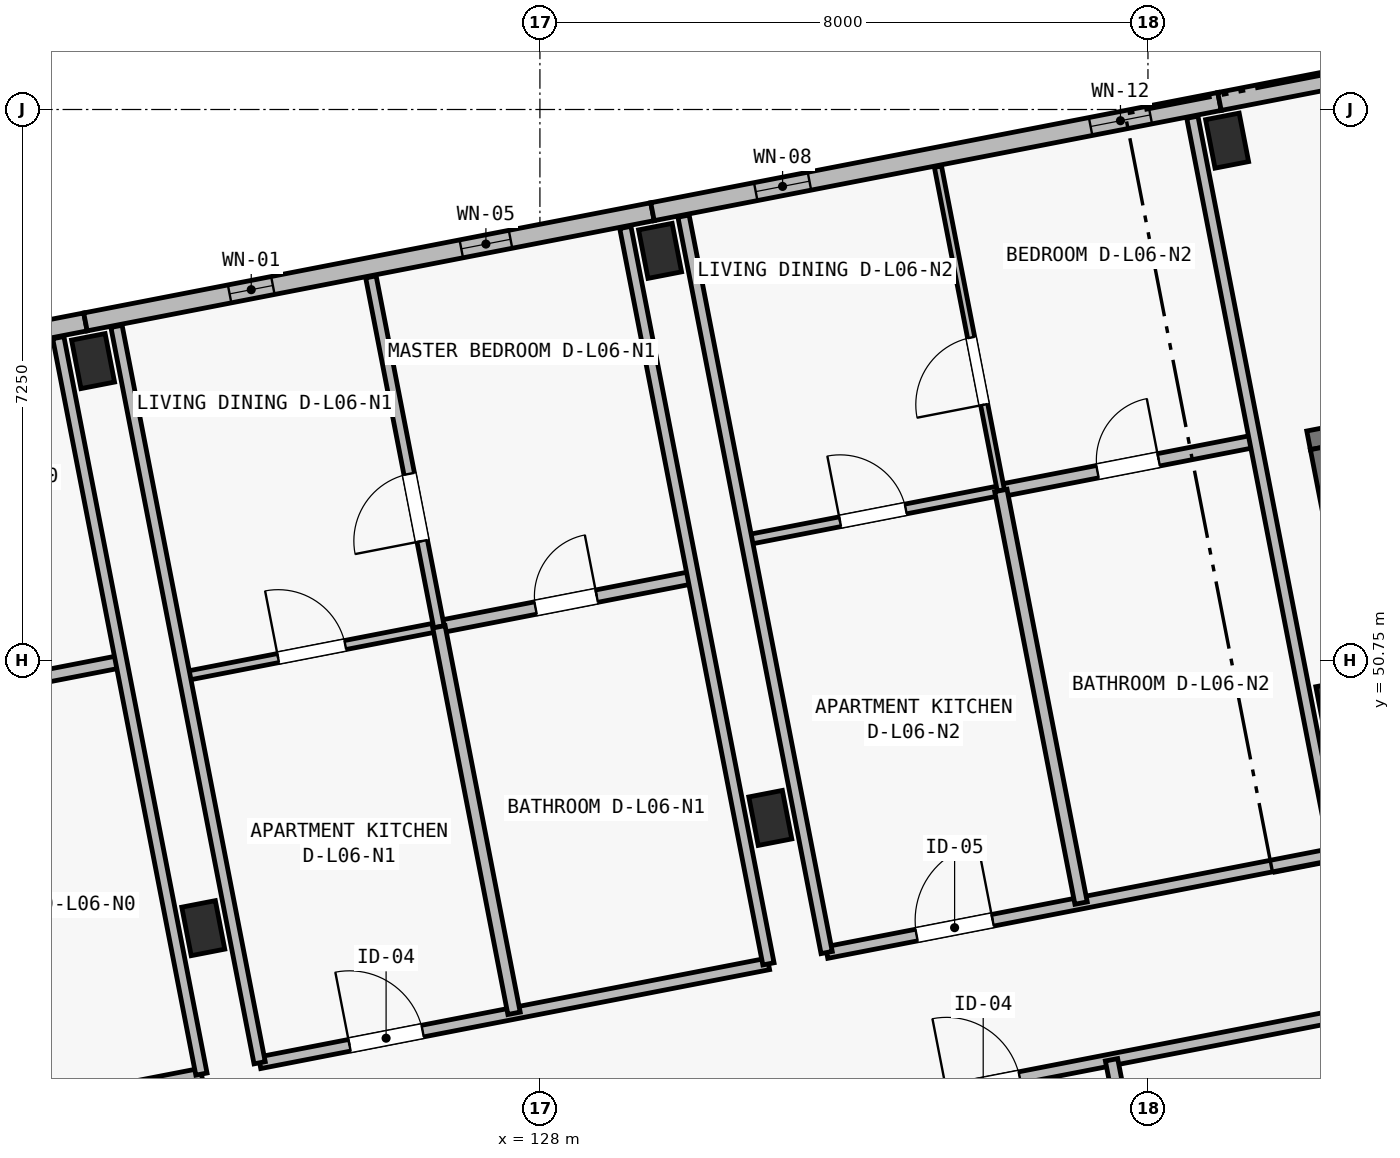
"""IFC4 building model, lengths in metres.
Left out: names, types, materials, properties, quantities, classifications, styles, units other than length and angle.
Written with IfcOpenShell. Run it as: python <this file> out.ifc"""

import sys

from ifc_helpers import new_model, si_unit, direction, frame, frame_2d, origin, origin_2d, place, context, subcontext, project, spatial, rectangle, extrude, element, fill, save


model = new_model("IFC4")
c1 = context("Model", 3, precision=1e-05, world=origin(), true_north=direction((0.0, 1.0)))
c2 = subcontext(c1, "Body", "Model", "MODEL_VIEW")
j1 = project(units=[si_unit("LENGTHUNIT", "METRE"), si_unit("PLANEANGLEUNIT", "RADIAN")], contexts=[c1])
p1 = place(None, origin())
s1 = spatial("IfcSite", under=j1, at=p1, CompositionType="ELEMENT")
p2 = place(p1, origin())
s2 = spatial("IfcBuilding", under=s1, at=p2, CompositionType="ELEMENT")
p3 = place(p2, frame((0.0, 0.0, 21.4)))
s3 = spatial("IfcBuildingStorey", under=s2, at=p3, CompositionType="ELEMENT", Elevation=21.4)
for number, where, z_axis, x_axis in (
    (1, (123.571, 47.23, 0.0), (0.0, 0.0, 1.0), (0.982, 0.191, 0.0)),
    (2, (122.121, 54.69, 0.0), (0.0, 0.0, 1.0), (0.982, 0.191, 0.0)),
    (3, (131.031, 48.68, 0.0), (0.0, 0.0, 1.0), (0.982, 0.191, 0.0)),
    (4, (129.581, 56.14, 0.0), (0.0, 0.0, 1.0), (0.982, 0.191, 0.0)),
    (5, (138.491, 50.13, 0.0), (0.0, 0.0, 1.0), (0.982, 0.191, 0.0)),
    (6, (137.041, 57.59, 0.0), (0.0, 0.0, 1.0), (0.982, 0.191, 0.0)),
):
    element("IfcColumn", number, at=place(p3, frame(where, z_axis=z_axis, x_axis=x_axis)), inside=s3, PredefinedType="COLUMN", context=c2, shape_type="SweptSolid", body=[
        extrude(rectangle(XDim=0.45, YDim=0.65, at=origin_2d()), origin(), (0.0, 0.0, 1.0), 3.25),
    ])
p4 = place(p3, frame((138.113, 53.647, 0.0), z_axis=(0.0, 0.0, 1.0), x_axis=(0.981626097708, 0.19081458094, 0.0)))
e7 = element("IfcWall", 7, at=p4, inside=s3, PredefinedType="SHEAR", context=c2, shape_type="SweptSolid", body=[
    extrude(rectangle(XDim=7.0, YDim=0.25, at=frame_2d((3.5, 0.0))), origin(), (0.0, 0.0, 1.0), 3.25),
])
p5 = place(p4, frame((0.45, 0.0, 0.0)))
e8 = element("IfcOpeningElement", 8, at=p5, cuts=e7, PredefinedType="OPENING", context=c2, shape_type="SweptSolid", body=[
    extrude(rectangle(XDim=0.9, YDim=2.1, at=frame_2d((0.45, 1.05))), frame((0.0, 0.14, 0.0), z_axis=(0.0, -1.0, 0.0), x_axis=(1.0, 0.0, 0.0)), (0.0, 0.0, 1.0), 0.28),
])
p6 = place(p3, frame((138.804, 50.751, 0.0), z_axis=(0.0, 0.0, 1.0), x_axis=(-0.190858194834, 0.981617618762, 0.0)))
e9 = element("IfcWall", 9, at=p6, inside=s3, PredefinedType="SHEAR", context=c2, shape_type="SweptSolid", body=[
    extrude(rectangle(XDim=2.85, YDim=0.25, at=frame_2d((1.425, 0.0))), origin(), (0.0, 0.0, 1.0), 3.25),
])
p7 = place(p3, frame((121.505, 55.105, 0.0), z_axis=(0.0, 0.0, 1.0), x_axis=(0.981656509867, 0.190658062077, 0.0)))
e10 = element("IfcWall", 10, at=p7, inside=s3, PredefinedType="SOLIDWALL", context=c2, shape_type="SweptSolid", body=[
    extrude(rectangle(XDim=0.525, YDim=0.24, at=frame_2d((0.262, 0.0))), origin(), (0.0, 0.0, 1.0), 3.0),
])
p8 = place(p3, frame((122.02, 55.205, 0.0), z_axis=(0.0, 0.0, 1.0), x_axis=(0.981626422232, 0.190812911449, 0.0)))
e11 = element("IfcWall", 11, at=p8, inside=s3, PredefinedType="SOLIDWALL", context=c2, shape_type="SweptSolid", body=[
    extrude(rectangle(XDim=7.6, YDim=0.24, at=frame_2d((3.8, 0.0))), origin(), (0.0, 0.0, 1.0), 3.0),
])
p9 = place(p8, frame((1.932, 0.0, 0.5)))
e12 = element("IfcOpeningElement", 12, at=p9, cuts=e11, PredefinedType="OPENING", context=c2, shape_type="SweptSolid", body=[
    extrude(rectangle(XDim=0.58, YDim=2.16, at=frame_2d((0.29, 1.08))), frame((0.0, 0.135, 0.0), z_axis=(0.0, -1.0, 0.0), x_axis=(1.0, 0.0, 0.0)), (0.0, 0.0, 1.0), 0.27),
])
p10 = place(p8, frame((5.038, 0.0, 0.44)))
e13 = element("IfcOpeningElement", 13, at=p10, cuts=e11, PredefinedType="OPENING", context=c2, shape_type="SweptSolid", body=[
    extrude(rectangle(XDim=0.66, YDim=2.32, at=frame_2d((0.33, 1.16))), frame((0.0, 0.135, 0.0), z_axis=(0.0, -1.0, 0.0), x_axis=(1.0, 0.0, 0.0)), (0.0, 0.0, 1.0), 0.27),
])
p11 = place(p3, frame((129.481, 56.656, 0.0), z_axis=(0.0, 0.0, 1.0), x_axis=(0.981626422232, 0.190812911449, 0.0)))
e14 = element("IfcWall", 14, at=p11, inside=s3, PredefinedType="SOLIDWALL", context=c2, shape_type="SweptSolid", body=[
    extrude(rectangle(XDim=7.6, YDim=0.24, at=frame_2d((3.8, 0.0))), origin(), (0.0, 0.0, 1.0), 3.0),
])
p12 = place(p11, frame((1.384, 0.0, 0.44)))
e15 = element("IfcOpeningElement", 15, at=p12, cuts=e14, PredefinedType="OPENING", context=c2, shape_type="SweptSolid", body=[
    extrude(rectangle(XDim=0.72, YDim=2.16, at=frame_2d((0.36, 1.08))), frame((0.0, 0.135, 0.0), z_axis=(0.0, -1.0, 0.0), x_axis=(1.0, 0.0, 0.0)), (0.0, 0.0, 1.0), 0.27),
])
p13 = place(p11, frame((5.873, 0.0, 0.5)))
e16 = element("IfcOpeningElement", 16, at=p13, cuts=e14, PredefinedType="OPENING", context=c2, shape_type="SweptSolid", body=[
    extrude(rectangle(XDim=0.8, YDim=2.3, at=frame_2d((0.4, 1.15))), frame((0.0, 0.135, 0.0), z_axis=(0.0, -1.0, 0.0), x_axis=(1.0, 0.0, 0.0)), (0.0, 0.0, 1.0), 0.27),
])
p14 = place(p3, frame((136.941, 58.106, 0.0), z_axis=(0.0, 0.0, 1.0), x_axis=(0.981629832251, 0.190795367961, 0.0)))
e17 = element("IfcWall", 17, at=p14, inside=s3, PredefinedType="SOLIDWALL", context=c2, shape_type="SweptSolid", body=[
    extrude(rectangle(XDim=2.375, YDim=0.24, at=frame_2d((1.188, 0.0))), origin(), (0.0, 0.0, 1.0), 3.0),
])
p15 = place(p3, frame((132.021, 44.818, 0.0), z_axis=(0.0, 0.0, 1.0), x_axis=(0.981629109582, 0.190799086008, 0.0)))
e18 = element("IfcWall", 18, at=p15, inside=s3, PredefinedType="PARTITIONING", context=c2, shape_type="SweptSolid", body=[
    extrude(rectangle(XDim=7.13, YDim=0.155, at=frame_2d((3.565, 0.0))), origin(), (0.0, 0.0, 1.0), 2.97),
])
p16 = place(p15, frame((1.355, 0.0, 0.0)))
e19 = element("IfcOpeningElement", 19, at=p16, cuts=e18, PredefinedType="OPENING", context=c2, shape_type="SweptSolid", body=[
    extrude(rectangle(XDim=0.98, YDim=2.15, at=frame_2d((0.49, 1.075))), frame((0.0, 0.093, 0.0), z_axis=(0.0, -1.0, 0.0), x_axis=(1.0, 0.0, 0.0)), (0.0, 0.0, 1.0), 0.185),
])
p17 = place(p3, frame((136.202, 41.994, 0.0), z_axis=(0.0, 0.0, 1.0), x_axis=(-0.190865998276, 0.981616101489, 0.0)))
e20 = element("IfcWall", 20, at=p17, inside=s3, PredefinedType="PLUMBINGWALL", context=c2, shape_type="SweptSolid", body=[
    extrude(rectangle(XDim=3.57, YDim=0.165, at=frame_2d((1.785, 0.0))), origin(), (0.0, 0.0, 1.0), 2.97),
])
p18 = place(p3, frame((116.852, 44.009, 0.0), z_axis=(0.0, 0.0, 1.0), x_axis=(0.981629173664, 0.190798756314, 0.0)))
e21 = element("IfcWall", 21, at=p18, inside=s3, PredefinedType="PARTITIONING", context=c2, shape_type="SweptSolid", body=[
    extrude(rectangle(XDim=6.82, YDim=0.155, at=frame_2d((3.41, 0.0))), origin(), (0.0, 0.0, 1.0), 2.97),
])
p19 = place(p18, frame((1.205, 0.0, 0.0)))
e22 = element("IfcOpeningElement", 22, at=p19, cuts=e21, PredefinedType="OPENING", context=c2, shape_type="SweptSolid", body=[
    extrude(rectangle(XDim=1.02, YDim=2.2, at=frame_2d((0.51, 1.1))), frame((0.0, 0.093, 0.0), z_axis=(0.0, -1.0, 0.0), x_axis=(1.0, 0.0, 0.0)), (0.0, 0.0, 1.0), 0.185),
])
p20 = place(p3, frame((119.144, 50.088, 0.0), z_axis=(0.0, 0.0, 1.0), x_axis=(0.981629173664, 0.190798756314, 0.0)))
e23 = element("IfcWall", 23, at=p20, inside=s3, PredefinedType="PLUMBINGWALL", context=c2, shape_type="SweptSolid", body=[
    extrude(rectangle(XDim=3.41, YDim=0.165, at=frame_2d((1.705, 0.0))), origin(), (0.0, 0.0, 1.0), 2.97),
])
p21 = place(p20, frame((1.295, 0.0, 0.0)))
e24 = element("IfcOpeningElement", 24, at=p21, cuts=e23, PredefinedType="OPENING", context=c2, shape_type="SweptSolid", body=[
    extrude(rectangle(XDim=0.82, YDim=2.08, at=frame_2d((0.41, 1.04))), frame((0.0, 0.097, 0.0), z_axis=(0.0, -1.0, 0.0), x_axis=(1.0, 0.0, 0.0)), (0.0, 0.0, 1.0), 0.195),
])
p22 = place(p3, frame((123.547, 45.31, 0.0), z_axis=(0.0, 0.0, 1.0), x_axis=(-0.190809410863, 0.981627102685, 0.0)))
e25 = element("IfcWall", 25, at=p22, inside=s3, PredefinedType="PARTITIONING", context=c2, shape_type="SweptSolid", body=[
    extrude(rectangle(XDim=9.87, YDim=0.15, at=frame_2d((4.935, 0.0))), origin(), (0.0, 0.0, 1.0), 2.97),
])
p23 = place(p3, frame((124.312, 45.459, 0.0), z_axis=(0.0, 0.0, 1.0), x_axis=(0.981627870431, 0.190805461121, 0.0)))
e26 = element("IfcWall", 26, at=p23, inside=s3, PredefinedType="PARTITIONING", context=c2, shape_type="SweptSolid", body=[
    extrude(rectangle(XDim=6.82, YDim=0.155, at=frame_2d((3.41, 0.0))), origin(), (0.0, 0.0, 1.0), 2.97),
])
p24 = place(p23, frame((1.205, 0.0, 0.0)))
e27 = element("IfcOpeningElement", 27, at=p24, cuts=e26, PredefinedType="OPENING", context=c2, shape_type="SweptSolid", body=[
    extrude(rectangle(XDim=0.98, YDim=2.15, at=frame_2d((0.49, 1.075))), frame((0.0, 0.093, 0.0), z_axis=(0.0, -1.0, 0.0), x_axis=(1.0, 0.0, 0.0)), (0.0, 0.0, 1.0), 0.185),
])
p25 = place(p3, frame((123.324, 50.543, 0.0), z_axis=(0.0, 0.0, 1.0), x_axis=(0.981629173664, 0.190798756314, 0.0)))
e28 = element("IfcWall", 28, at=p25, inside=s3, PredefinedType="PARTITIONING", context=c2, shape_type="SweptSolid", body=[
    extrude(rectangle(XDim=3.41, YDim=0.12, at=frame_2d((1.705, 0.0))), origin(), (0.0, 0.0, 1.0), 2.97),
])
p26 = place(p25, frame((1.255, 0.0, 0.0)))
e29 = element("IfcOpeningElement", 29, at=p26, cuts=e28, PredefinedType="OPENING", context=c2, shape_type="SweptSolid", body=[
    extrude(rectangle(XDim=0.9, YDim=2.1, at=frame_2d((0.45, 1.05))), frame((0.0, 0.075, 0.0), z_axis=(0.0, -1.0, 0.0), x_axis=(1.0, 0.0, 0.0)), (0.0, 0.0, 1.0), 0.15),
])
p27 = place(p3, frame((126.671, 51.194, 0.0), z_axis=(0.0, 0.0, 1.0), x_axis=(0.981629173664, 0.190798756314, 0.0)))
e30 = element("IfcWall", 30, at=p27, inside=s3, PredefinedType="PLUMBINGWALL", context=c2, shape_type="SweptSolid", body=[
    extrude(rectangle(XDim=3.41, YDim=0.165, at=frame_2d((1.705, 0.0))), origin(), (0.0, 0.0, 1.0), 2.97),
])
p28 = place(p27, frame((1.295, 0.0, 0.0)))
e31 = element("IfcOpeningElement", 31, at=p28, cuts=e30, PredefinedType="OPENING", context=c2, shape_type="SweptSolid", body=[
    extrude(rectangle(XDim=0.82, YDim=2.08, at=frame_2d((0.41, 1.04))), frame((0.0, 0.097, 0.0), z_axis=(0.0, -1.0, 0.0), x_axis=(1.0, 0.0, 0.0)), (0.0, 0.0, 1.0), 0.195),
])
p29 = place(p3, frame((126.671, 51.194, 0.0), z_axis=(0.0, 0.0, 1.0), x_axis=(-0.190787451574, 0.981631370893, 0.0)))
e32 = element("IfcWall", 32, at=p29, inside=s3, PredefinedType="PARTITIONING", context=c2, shape_type="SweptSolid", body=[
    extrude(rectangle(XDim=4.69, YDim=0.14, at=frame_2d((2.345, 0.0))), origin(), (0.0, 0.0, 1.0), 2.97),
])
p30 = place(p29, frame((1.15, 0.0, 0.0)))
e33 = element("IfcOpeningElement", 33, at=p30, cuts=e32, PredefinedType="OPENING", context=c2, shape_type="SweptSolid", body=[
    extrude(rectangle(XDim=0.9, YDim=2.1, at=frame_2d((0.45, 1.05))), frame((0.0, 0.085, 0.0), z_axis=(0.0, -1.0, 0.0), x_axis=(1.0, 0.0, 0.0)), (0.0, 0.0, 1.0), 0.17),
])
p31 = place(p3, frame((127.66, 46.109, 0.0), z_axis=(0.0, 0.0, 1.0), x_axis=(-0.190838120755, 0.981621521599, 0.0)))
e34 = element("IfcWall", 34, at=p31, inside=s3, PredefinedType="PLUMBINGWALL", context=c2, shape_type="SweptSolid", body=[
    extrude(rectangle(XDim=5.18, YDim=0.165, at=frame_2d((2.59, 0.0))), origin(), (0.0, 0.0, 1.0), 2.97),
])
p32 = place(p3, frame((124.312, 45.459, 0.0), z_axis=(0.0, 0.0, 1.0), x_axis=(-0.190814044018, 0.981626202078, 0.0)))
e35 = element("IfcWall", 35, at=p32, inside=s3, PredefinedType="PARTITIONING", context=c2, shape_type="SweptSolid", body=[
    extrude(rectangle(XDim=9.87, YDim=0.15, at=frame_2d((4.935, 0.0))), origin(), (0.0, 0.0, 1.0), 2.97),
])
p33 = place(p3, frame((131.007, 46.76, 0.0), z_axis=(0.0, 0.0, 1.0), x_axis=(-0.190809410863, 0.981627102685, 0.0)))
e36 = element("IfcWall", 36, at=p33, inside=s3, PredefinedType="PARTITIONING", context=c2, shape_type="SweptSolid", body=[
    extrude(rectangle(XDim=9.87, YDim=0.15, at=frame_2d((4.935, 0.0))), origin(), (0.0, 0.0, 1.0), 2.97),
])
p34 = place(p3, frame((131.772, 46.909, 0.0), z_axis=(0.0, 0.0, 1.0), x_axis=(0.981622468528, 0.190833249935, 0.0)))
e37 = element("IfcWall", 37, at=p34, inside=s3, PredefinedType="PARTITIONING", context=c2, shape_type="SweptSolid", body=[
    extrude(rectangle(XDim=6.82, YDim=0.155, at=frame_2d((3.41, 0.0))), origin(), (0.0, 0.0, 1.0), 2.97),
])
p35 = place(p34, frame((1.205, 0.0, 0.0)))
e38 = element("IfcOpeningElement", 38, at=p35, cuts=e37, PredefinedType="OPENING", context=c2, shape_type="SweptSolid", body=[
    extrude(rectangle(XDim=1.02, YDim=2.2, at=frame_2d((0.51, 1.1))), frame((0.0, 0.093, 0.0), z_axis=(0.0, -1.0, 0.0), x_axis=(1.0, 0.0, 0.0)), (0.0, 0.0, 1.0), 0.185),
])
p36 = place(p3, frame((130.717, 52.337, 0.0), z_axis=(0.0, 0.0, 1.0), x_axis=(0.981629173664, 0.190798756314, 0.0)))
e39 = element("IfcWall", 39, at=p36, inside=s3, PredefinedType="PARTITIONING", context=c2, shape_type="SweptSolid", body=[
    extrude(rectangle(XDim=3.41, YDim=0.13, at=frame_2d((1.705, 0.0))), origin(), (0.0, 0.0, 1.0), 2.97),
])
p37 = place(p36, frame((1.255, 0.0, 0.0)))
e40 = element("IfcOpeningElement", 40, at=p37, cuts=e39, PredefinedType="OPENING", context=c2, shape_type="SweptSolid", body=[
    extrude(rectangle(XDim=0.88, YDim=2.1, at=frame_2d((0.44, 1.05))), frame((0.0, 0.08, 0.0), z_axis=(0.0, -1.0, 0.0), x_axis=(1.0, 0.0, 0.0)), (0.0, 0.0, 1.0), 0.16),
])
p38 = place(p3, frame((134.065, 52.988, 0.0), z_axis=(0.0, 0.0, 1.0), x_axis=(0.981629173664, 0.190798756314, 0.0)))
e41 = element("IfcWall", 41, at=p38, inside=s3, PredefinedType="PLUMBINGWALL", context=c2, shape_type="SweptSolid", body=[
    extrude(rectangle(XDim=3.41, YDim=0.165, at=frame_2d((1.705, 0.0))), origin(), (0.0, 0.0, 1.0), 2.97),
])
p39 = place(p38, frame((1.295, 0.0, 0.0)))
e42 = element("IfcOpeningElement", 42, at=p39, cuts=e41, PredefinedType="OPENING", context=c2, shape_type="SweptSolid", body=[
    extrude(rectangle(XDim=0.82, YDim=2.08, at=frame_2d((0.41, 1.04))), frame((0.0, 0.097, 0.0), z_axis=(0.0, -1.0, 0.0), x_axis=(1.0, 0.0, 0.0)), (0.0, 0.0, 1.0), 0.195),
])
p40 = place(p3, frame((134.065, 52.988, 0.0), z_axis=(0.0, 0.0, 1.0), x_axis=(-0.190812443151, 0.981626513262, 0.0)))
e43 = element("IfcWall", 43, at=p40, inside=s3, PredefinedType="PARTITIONING", context=c2, shape_type="SweptSolid", body=[
    extrude(rectangle(XDim=4.34, YDim=0.095, at=frame_2d((2.17, 0.0))), origin(), (0.0, 0.0, 1.0), 2.97),
])
p41 = place(p40, frame((1.15, 0.0, 0.0)))
e44 = element("IfcOpeningElement", 44, at=p41, cuts=e43, PredefinedType="OPENING", context=c2, shape_type="SweptSolid", body=[
    extrude(rectangle(XDim=0.9, YDim=2.1, at=frame_2d((0.45, 1.05))), frame((0.0, 0.062, 0.0), z_axis=(0.0, -1.0, 0.0), x_axis=(1.0, 0.0, 0.0)), (0.0, 0.0, 1.0), 0.125),
])
p42 = place(p3, frame((135.12, 47.559, 0.0), z_axis=(0.0, 0.0, 1.0), x_axis=(-0.190807031124, 0.981627565258, 0.0)))
e45 = element("IfcWall", 45, at=p42, inside=s3, PredefinedType="PLUMBINGWALL", context=c2, shape_type="SweptSolid", body=[
    extrude(rectangle(XDim=5.53, YDim=0.165, at=frame_2d((2.765, 0.0))), origin(), (0.0, 0.0, 1.0), 2.97),
])
p43 = place(p3, frame((131.772, 46.909, 0.0), z_axis=(0.0, 0.0, 1.0), x_axis=(-0.1907855758, 0.981631735462, 0.0)))
e46 = element("IfcWall", 46, at=p43, inside=s3, PredefinedType="PARTITIONING", context=c2, shape_type="SweptSolid", body=[
    extrude(rectangle(XDim=9.87, YDim=0.15, at=frame_2d((4.935, 0.0))), origin(), (0.0, 0.0, 1.0), 2.97),
])
p44 = place(p3, frame((138.467, 48.21, 0.0), z_axis=(0.0, 0.0, 1.0), x_axis=(-0.190814044018, 0.981626202078, 0.0)))
e47 = element("IfcWall", 47, at=p44, inside=s3, PredefinedType="PARTITIONING", context=c2, shape_type="SweptSolid", body=[
    extrude(rectangle(XDim=9.87, YDim=0.15, at=frame_2d((4.935, 0.0))), origin(), (0.0, 0.0, 1.0), 2.97),
])
p45 = place(p9, origin())
e48 = element("IfcWindow", 48, at=p45, inside=s3, PartitioningType="SINGLE_PANEL", PredefinedType="WINDOW", context=c2, shape_type="SweptSolid", body=[
    extrude(rectangle(XDim=0.58, YDim=2.16, at=frame_2d((0.29, 1.08))), frame((0.0, 0.03, 0.0), z_axis=(0.0, -1.0, 0.0), x_axis=(1.0, 0.0, 0.0)), (0.0, 0.0, 1.0), 0.06),
])
fill(e12, e48)
p46 = place(p10, origin())
e49 = element("IfcWindow", 49, at=p46, inside=s3, PartitioningType="SINGLE_PANEL", PredefinedType="WINDOW", context=c2, shape_type="SweptSolid", body=[
    extrude(rectangle(XDim=0.66, YDim=2.32, at=frame_2d((0.33, 1.16))), frame((0.0, 0.03, 0.0), z_axis=(0.0, -1.0, 0.0), x_axis=(1.0, 0.0, 0.0)), (0.0, 0.0, 1.0), 0.06),
])
fill(e13, e49)
p47 = place(p12, origin())
e50 = element("IfcWindow", 50, at=p47, inside=s3, PartitioningType="SINGLE_PANEL", PredefinedType="WINDOW", context=c2, shape_type="SweptSolid", body=[
    extrude(rectangle(XDim=0.72, YDim=2.16, at=frame_2d((0.36, 1.08))), frame((0.0, 0.03, 0.0), z_axis=(0.0, -1.0, 0.0), x_axis=(1.0, 0.0, 0.0)), (0.0, 0.0, 1.0), 0.06),
])
fill(e15, e50)
p48 = place(p13, origin())
e51 = element("IfcWindow", 51, at=p48, inside=s3, PartitioningType="SINGLE_PANEL", PredefinedType="WINDOW", context=c2, shape_type="SweptSolid", body=[
    extrude(rectangle(XDim=0.8, YDim=2.3, at=frame_2d((0.4, 1.15))), frame((0.0, 0.03, 0.0), z_axis=(0.0, -1.0, 0.0), x_axis=(1.0, 0.0, 0.0)), (0.0, 0.0, 1.0), 0.06),
])
fill(e16, e51)
p49 = place(p16, origin())
e52 = element("IfcDoor", 52, at=p49, inside=s3, OperationType="SINGLE_SWING_LEFT", PredefinedType="DOOR", context=c2, shape_type="SweptSolid", body=[
    extrude(rectangle(XDim=0.98, YDim=2.15, at=frame_2d((0.49, 1.075))), frame((0.0, 0.025, 0.0), z_axis=(0.0, -1.0, 0.0), x_axis=(1.0, 0.0, 0.0)), (0.0, 0.0, 1.0), 0.05),
])
fill(e19, e52)
p50 = place(p24, origin())
e53 = element("IfcDoor", 53, at=p50, inside=s3, OperationType="SINGLE_SWING_LEFT", PredefinedType="DOOR", context=c2, shape_type="SweptSolid", body=[
    extrude(rectangle(XDim=0.98, YDim=2.15, at=frame_2d((0.49, 1.075))), frame((0.0, 0.025, 0.0), z_axis=(0.0, -1.0, 0.0), x_axis=(1.0, 0.0, 0.0)), (0.0, 0.0, 1.0), 0.05),
])
fill(e27, e53)
p51 = place(p26, origin())
e54 = element("IfcDoor", 54, at=p51, inside=s3, OperationType="SINGLE_SWING_LEFT", PredefinedType="DOOR", context=c2, shape_type="SweptSolid", body=[
    extrude(rectangle(XDim=0.9, YDim=2.1, at=frame_2d((0.45, 1.05))), frame((0.0, 0.025, 0.0), z_axis=(0.0, -1.0, 0.0), x_axis=(1.0, 0.0, 0.0)), (0.0, 0.0, 1.0), 0.05),
])
fill(e29, e54)
p52 = place(p28, origin())
e55 = element("IfcDoor", 55, at=p52, inside=s3, OperationType="SINGLE_SWING_RIGHT", PredefinedType="DOOR", context=c2, shape_type="SweptSolid", body=[
    extrude(rectangle(XDim=0.82, YDim=2.08, at=frame_2d((0.41, 1.04))), frame((0.0, 0.025, 0.0), z_axis=(0.0, -1.0, 0.0), x_axis=(1.0, 0.0, 0.0)), (0.0, 0.0, 1.0), 0.05),
])
fill(e31, e55)
p53 = place(p30, origin())
e56 = element("IfcDoor", 56, at=p53, inside=s3, OperationType="SINGLE_SWING_LEFT", PredefinedType="DOOR", context=c2, shape_type="SweptSolid", body=[
    extrude(rectangle(XDim=0.9, YDim=2.1, at=frame_2d((0.45, 1.05))), frame((0.0, 0.025, 0.0), z_axis=(0.0, -1.0, 0.0), x_axis=(1.0, 0.0, 0.0)), (0.0, 0.0, 1.0), 0.05),
])
fill(e33, e56)
p54 = place(p35, origin())
e57 = element("IfcDoor", 57, at=p54, inside=s3, OperationType="SINGLE_SWING_RIGHT", PredefinedType="DOOR", context=c2, shape_type="SweptSolid", body=[
    extrude(rectangle(XDim=1.02, YDim=2.2, at=frame_2d((0.51, 1.1))), frame((0.0, 0.025, 0.0), z_axis=(0.0, -1.0, 0.0), x_axis=(1.0, 0.0, 0.0)), (0.0, 0.0, 1.0), 0.05),
])
fill(e38, e57)
p55 = place(p37, origin())
e58 = element("IfcDoor", 58, at=p55, inside=s3, OperationType="SINGLE_SWING_LEFT", PredefinedType="DOOR", context=c2, shape_type="SweptSolid", body=[
    extrude(rectangle(XDim=0.88, YDim=2.1, at=frame_2d((0.44, 1.05))), frame((0.0, 0.025, 0.0), z_axis=(0.0, -1.0, 0.0), x_axis=(1.0, 0.0, 0.0)), (0.0, 0.0, 1.0), 0.05),
])
fill(e40, e58)
p56 = place(p39, origin())
e59 = element("IfcDoor", 59, at=p56, inside=s3, OperationType="SINGLE_SWING_RIGHT", PredefinedType="DOOR", context=c2, shape_type="SweptSolid", body=[
    extrude(rectangle(XDim=0.82, YDim=2.08, at=frame_2d((0.41, 1.04))), frame((0.0, 0.025, 0.0), z_axis=(0.0, -1.0, 0.0), x_axis=(1.0, 0.0, 0.0)), (0.0, 0.0, 1.0), 0.05),
])
fill(e42, e59)
p57 = place(p41, origin())
e60 = element("IfcDoor", 60, at=p57, inside=s3, OperationType="SINGLE_SWING_LEFT", PredefinedType="DOOR", context=c2, shape_type="SweptSolid", body=[
    extrude(rectangle(XDim=0.9, YDim=2.1, at=frame_2d((0.45, 1.05))), frame((0.0, 0.025, 0.0), z_axis=(0.0, -1.0, 0.0), x_axis=(1.0, 0.0, 0.0)), (0.0, 0.0, 1.0), 0.05),
])
fill(e44, e60)
save(model, sys.argv[1])
